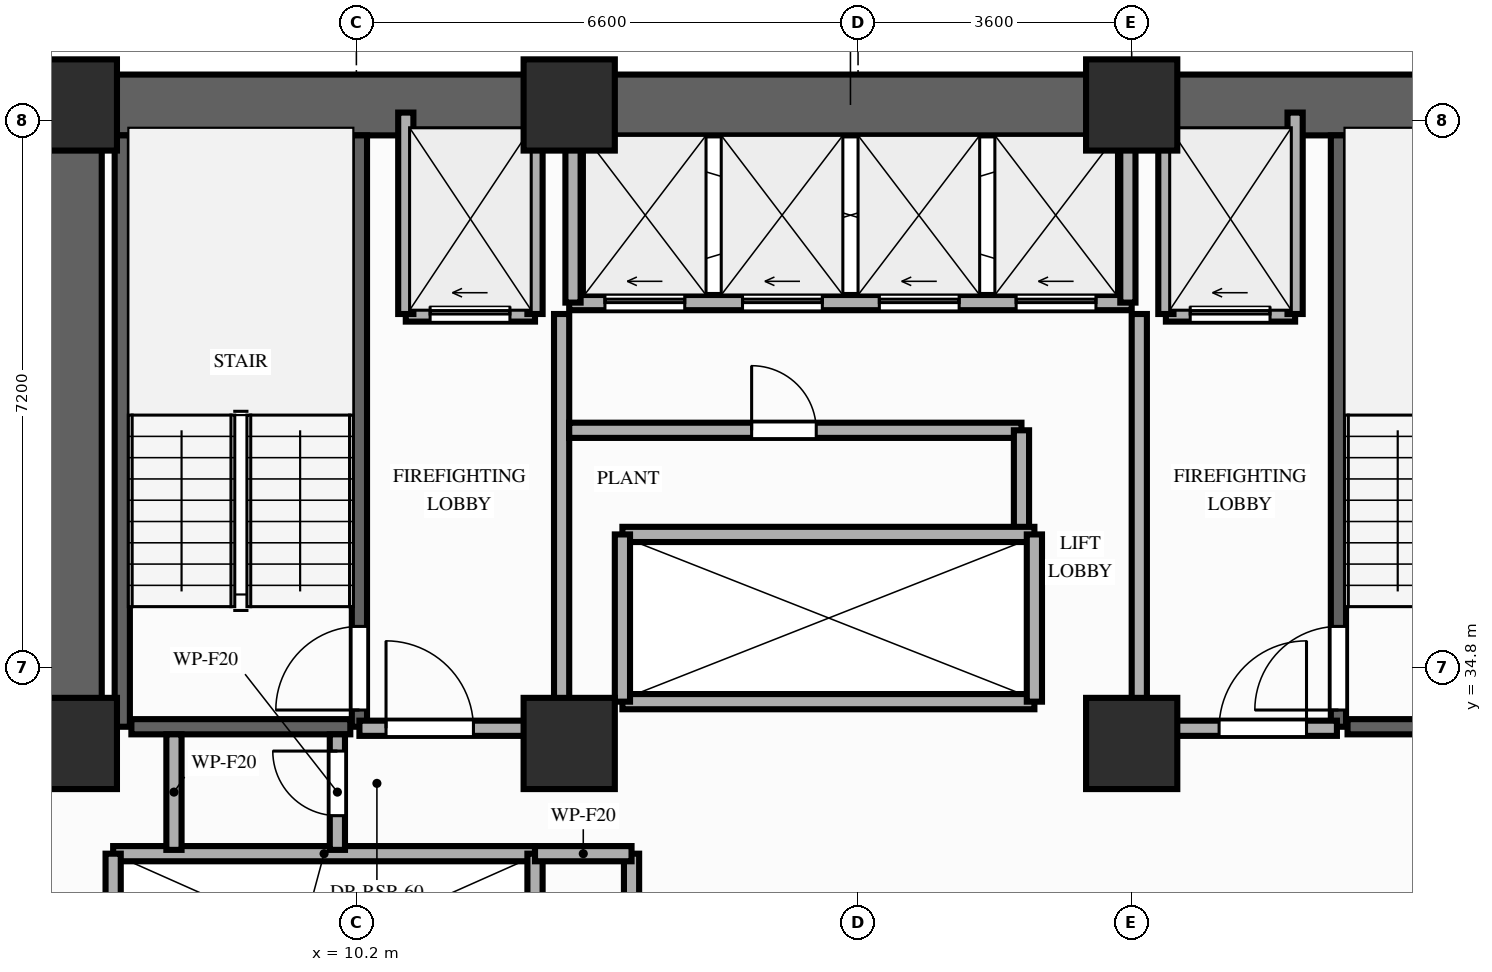
"""IFC4 building model, lengths in metres.
Left out: names, types, materials, properties, quantities, classifications, styles, units other than length and angle.
Written with IfcOpenShell. Run it as: python <this file> out.ifc"""

import sys

from ifc_helpers import new_model, si_unit, direction, frame, frame_2d, origin, origin_2d, place, context, subcontext, project, spatial, rectangle, extrude, element, fill, save


model = new_model("IFC4")
c1 = context("Model", 3, precision=1e-05, world=origin(), true_north=direction((0.0, 1.0)))
c2 = subcontext(c1, "Body", "Model", "MODEL_VIEW")
j1 = project(units=[si_unit("LENGTHUNIT", "METRE"), si_unit("PLANEANGLEUNIT", "RADIAN")], contexts=[c1])
p1 = place(None, origin())
s1 = spatial("IfcSite", under=j1, at=p1, CompositionType="ELEMENT")
p2 = place(p1, origin())
s2 = spatial("IfcBuilding", under=s1, at=p2, CompositionType="ELEMENT")
p3 = place(p2, frame((0.0, 0.0, 50.0)))
s3 = spatial("IfcBuildingStorey", under=s2, at=p3, CompositionType="ELEMENT", Elevation=50.0)
for number, where, z_axis, x_axis in (
    (1, (6.45, 33.8, 0.0), (0.0, 0.0, 1.0), (1.0, 0.0, 0.0)),
    (2, (13.0, 33.8, 0.0), (0.0, 0.0, 1.0), (1.0, 0.0, 0.0)),
    (3, (20.4, 33.8, 0.0), (0.0, 0.0, 1.0), (1.0, 0.0, 0.0)),
    (4, (6.45, 42.2, 0.0), (0.0, 0.0, 1.0), (1.0, 0.0, 0.0)),
    (5, (13.0, 42.2, 0.0), (0.0, 0.0, 1.0), (1.0, 0.0, 0.0)),
    (6, (20.4, 42.2, 0.0), (0.0, 0.0, 1.0), (1.0, 0.0, 0.0)),
):
    element("IfcColumn", number, at=place(p3, frame(where, z_axis=z_axis, x_axis=x_axis)), inside=s3, PredefinedType="COLUMN", context=c2, shape_type="SweptSolid", body=[
        extrude(rectangle(XDim=1.2, YDim=1.2, at=origin_2d()), origin(), (0.0, 0.0, 1.0), 3.2),
    ])
p4 = place(p3, frame((6.45, 42.2, 0.0), z_axis=(0.0, 0.0, 1.0), x_axis=(1.0, 0.0, 0.0)))
e7 = element("IfcWall", 7, at=p4, inside=s3, PredefinedType="SHEAR", context=c2, shape_type="SweptSolid", body=[
    extrude(rectangle(XDim=20.45, YDim=0.8, at=frame_2d((10.225, 0.0))), origin(), (0.0, 0.0, 1.0), 3.02),
])
p5 = place(p3, frame((6.45, 33.8, 0.0), z_axis=(0.0, 0.0, 1.0), x_axis=(0.0, 1.0, 0.0)))
e8 = element("IfcWall", 8, at=p5, inside=s3, PredefinedType="SHEAR", context=c2, shape_type="SweptSolid", body=[
    extrude(rectangle(XDim=7.95, YDim=0.8, at=frame_2d((3.975, 0.0))), origin(), (0.0, 0.0, 1.0), 3.02),
])
p6 = place(p3, frame((7.12, 34.02, 0.0), z_axis=(0.0, 0.0, 1.0), x_axis=(0.0, 1.0, 0.0)))
e9 = element("IfcWall", 9, at=p6, inside=s3, PredefinedType="SHEAR", context=c2, shape_type="SweptSolid", body=[
    extrude(rectangle(XDim=7.78, YDim=0.2, at=frame_2d((3.89, 0.0))), origin(), (0.0, 0.0, 1.0), 3.02),
])
p7 = place(p3, frame((10.24, 34.02, 0.0), z_axis=(0.0, 0.0, 1.0), x_axis=(0.0, 1.0, 0.0)))
e10 = element("IfcWall", 10, at=p7, inside=s3, PredefinedType="SHEAR", context=c2, shape_type="SweptSolid", body=[
    extrude(rectangle(XDim=7.78, YDim=0.2, at=frame_2d((3.89, 0.0))), origin(), (0.0, 0.0, 1.0), 3.02),
])
p8 = place(p7, frame((0.22, 0.0, 0.0)))
e11 = element("IfcOpeningElement", 11, at=p8, cuts=e10, PredefinedType="OPENING", context=c2, shape_type="SweptSolid", body=[
    extrude(rectangle(XDim=1.1, YDim=2.15, at=frame_2d((0.55, 1.075))), frame((0.0, 0.11, 0.0), z_axis=(0.0, -1.0, 0.0), x_axis=(1.0, 0.0, 0.0)), (0.0, 0.0, 1.0), 0.22),
])
p9 = place(p3, frame((7.24, 34.02, 0.0), z_axis=(0.0, 0.0, 1.0), x_axis=(1.0, 0.0, 0.0)))
e12 = element("IfcWall", 12, at=p9, inside=s3, PredefinedType="SHEAR", context=c2, shape_type="SweptSolid", body=[
    extrude(rectangle(XDim=2.88, YDim=0.2, at=frame_2d((1.44, 0.0))), origin(), (0.0, 0.0, 1.0), 3.02),
])
p10 = place(p3, frame((23.12, 34.02, 0.0), z_axis=(0.0, 0.0, 1.0), x_axis=(0.0, 1.0, 0.0)))
e13 = element("IfcWall", 13, at=p10, inside=s3, PredefinedType="SHEAR", context=c2, shape_type="SweptSolid", body=[
    extrude(rectangle(XDim=7.78, YDim=0.2, at=frame_2d((3.89, 0.0))), origin(), (0.0, 0.0, 1.0), 3.02),
])
p11 = place(p10, frame((0.22, 0.0, 0.0)))
e14 = element("IfcOpeningElement", 14, at=p11, cuts=e13, PredefinedType="OPENING", context=c2, shape_type="SweptSolid", body=[
    extrude(rectangle(XDim=1.1, YDim=2.15, at=frame_2d((0.55, 1.075))), frame((0.0, 0.11, 0.0), z_axis=(0.0, -1.0, 0.0), x_axis=(1.0, 0.0, 0.0)), (0.0, 0.0, 1.0), 0.22),
])
p12 = place(p3, frame((23.24, 34.02, 0.0), z_axis=(0.0, 0.0, 1.0), x_axis=(1.0, 0.0, 0.0)))
e15 = element("IfcWall", 15, at=p12, inside=s3, PredefinedType="SHEAR", context=c2, shape_type="SweptSolid", body=[
    extrude(rectangle(XDim=2.88, YDim=0.2, at=frame_2d((1.44, 0.0))), origin(), (0.0, 0.0, 1.0), 3.02),
])
p13 = place(p3, frame((7.0, 32.35, 0.0), z_axis=(0.0, 0.0, 1.0), x_axis=(1.0, 0.0, 0.0)))
e16 = element("IfcWall", 16, at=p13, inside=s3, PredefinedType="MOVABLE", context=c2, shape_type="SweptSolid", body=[
    extrude(rectangle(XDim=5.55, YDim=0.2, at=frame_2d((2.775, 0.0))), origin(), (0.0, 0.0, 1.0), 3.02),
])
for number, where, z_axis, x_axis in (
    (17, (7.0, 29.85, 0.0), (0.0, 0.0, 1.0), (0.0, 1.0, 0.0)),
    (18, (12.55, 29.85, 0.0), (0.0, 0.0, 1.0), (0.0, 1.0, 0.0)),
):
    element("IfcWall", number, at=place(p3, frame(where, z_axis=z_axis, x_axis=x_axis)), inside=s3, PredefinedType="MOVABLE", context=c2, shape_type="SweptSolid", body=[
        extrude(rectangle(XDim=2.5, YDim=0.2, at=frame_2d((1.25, 0.0))), origin(), (0.0, 0.0, 1.0), 3.02),
    ])
p14 = place(p3, frame((10.85, 39.45, 0.0), z_axis=(0.0, 0.0, 1.0), x_axis=(1.0, 0.0, 0.0)))
e19 = element("IfcWall", 19, at=p14, inside=s3, PredefinedType="MOVABLE", context=c2, shape_type="SweptSolid", body=[
    extrude(rectangle(XDim=1.7, YDim=0.2, at=frame_2d((0.85, 0.0))), origin(), (0.0, 0.0, 1.0), 3.02),
])
p15 = place(p14, frame((0.32, 0.0, 0.0)))
e20 = element("IfcOpeningElement", 20, at=p15, cuts=e19, PredefinedType="OPENING", context=c2, shape_type="SweptSolid", body=[
    extrude(rectangle(XDim=1.05, YDim=2.15, at=frame_2d((0.525, 1.075))), frame((0.0, 0.11, 0.0), z_axis=(0.0, -1.0, 0.0), x_axis=(1.0, 0.0, 0.0)), (0.0, 0.0, 1.0), 0.22),
])
p16 = place(p3, frame((20.85, 39.45, 0.0), z_axis=(0.0, 0.0, 1.0), x_axis=(1.0, 0.0, 0.0)))
e21 = element("IfcWall", 21, at=p16, inside=s3, PredefinedType="MOVABLE", context=c2, shape_type="SweptSolid", body=[
    extrude(rectangle(XDim=1.7, YDim=0.2, at=frame_2d((0.85, 0.0))), origin(), (0.0, 0.0, 1.0), 3.02),
])
p17 = place(p16, frame((0.32, 0.0, 0.0)))
e22 = element("IfcOpeningElement", 22, at=p17, cuts=e21, PredefinedType="OPENING", context=c2, shape_type="SweptSolid", body=[
    extrude(rectangle(XDim=1.05, YDim=2.15, at=frame_2d((0.525, 1.075))), frame((0.0, 0.11, 0.0), z_axis=(0.0, -1.0, 0.0), x_axis=(1.0, 0.0, 0.0)), (0.0, 0.0, 1.0), 0.22),
])
for number, where, z_axis, x_axis in (
    (23, (10.85, 39.45, 0.0), (0.0, 0.0, 1.0), (0.0, 1.0, 0.0)),
    (24, (12.55, 39.45, 0.0), (0.0, 0.0, 1.0), (0.0, 1.0, 0.0)),
):
    element("IfcWall", number, at=place(p3, frame(where, z_axis=z_axis, x_axis=x_axis)), inside=s3, PredefinedType="MOVABLE", context=c2, shape_type="SweptSolid", body=[
        extrude(rectangle(XDim=2.65, YDim=0.2, at=frame_2d((1.325, 0.0))), origin(), (0.0, 0.0, 1.0), 2.41),
    ])
p18 = place(p3, frame((12.9, 34.0, 0.0), z_axis=(0.0, 0.0, 1.0), x_axis=(0.0, 1.0, 0.0)))
e25 = element("IfcWall", 25, at=p18, inside=s3, PredefinedType="PARTITIONING", context=c2, shape_type="SweptSolid", body=[
    extrude(rectangle(XDim=5.45, YDim=0.2, at=frame_2d((2.725, 0.0))), origin(), (0.0, 0.0, 1.0), 2.41),
])
p19 = place(p3, frame((10.24, 34.0, 0.0), z_axis=(0.0, 0.0, 1.0), x_axis=(1.0, 0.0, 0.0)))
e26 = element("IfcWall", 26, at=p19, inside=s3, PredefinedType="PARTITIONING", context=c2, shape_type="SweptSolid", body=[
    extrude(rectangle(XDim=2.66, YDim=0.2, at=frame_2d((1.33, 0.0))), origin(), (0.0, 0.0, 1.0), 2.41),
])
p20 = place(p19, frame((0.35, 0.0, 0.0)))
e27 = element("IfcOpeningElement", 27, at=p20, cuts=e26, PredefinedType="OPENING", context=c2, shape_type="SweptSolid", body=[
    extrude(rectangle(XDim=1.15, YDim=2.15, at=frame_2d((0.575, 1.075))), frame((0.0, 0.11, 0.0), z_axis=(0.0, -1.0, 0.0), x_axis=(1.0, 0.0, 0.0)), (0.0, 0.0, 1.0), 0.22),
])
for number, where, z_axis, x_axis in (
    (28, (20.85, 39.45, 0.0), (0.0, 0.0, 1.0), (0.0, 1.0, 0.0)),
    (29, (22.55, 39.45, 0.0), (0.0, 0.0, 1.0), (0.0, 1.0, 0.0)),
):
    element("IfcWall", number, at=place(p3, frame(where, z_axis=z_axis, x_axis=x_axis)), inside=s3, PredefinedType="MOVABLE", context=c2, shape_type="SweptSolid", body=[
        extrude(rectangle(XDim=2.65, YDim=0.2, at=frame_2d((1.325, 0.0))), origin(), (0.0, 0.0, 1.0), 2.41),
    ])
p21 = place(p3, frame((20.5, 34.0, 0.0), z_axis=(0.0, 0.0, 1.0), x_axis=(0.0, 1.0, 0.0)))
e30 = element("IfcWall", 30, at=p21, inside=s3, PredefinedType="PARTITIONING", context=c2, shape_type="SweptSolid", body=[
    extrude(rectangle(XDim=5.45, YDim=0.2, at=frame_2d((2.725, 0.0))), origin(), (0.0, 0.0, 1.0), 2.41),
])
p22 = place(p3, frame((20.5, 34.0, 0.0), z_axis=(0.0, 0.0, 1.0), x_axis=(1.0, 0.0, 0.0)))
e31 = element("IfcWall", 31, at=p22, inside=s3, PredefinedType="PARTITIONING", context=c2, shape_type="SweptSolid", body=[
    extrude(rectangle(XDim=2.6, YDim=0.2, at=frame_2d((1.3, 0.0))), origin(), (0.0, 0.0, 1.0), 2.41),
])
p23 = place(p22, frame((1.05, 0.0, 0.0)))
e32 = element("IfcOpeningElement", 32, at=p23, cuts=e31, PredefinedType="OPENING", context=c2, shape_type="SweptSolid", body=[
    extrude(rectangle(XDim=1.15, YDim=2.15, at=frame_2d((0.575, 1.075))), frame((0.0, 0.11, 0.0), z_axis=(0.0, -1.0, 0.0), x_axis=(1.0, 0.0, 0.0)), (0.0, 0.0, 1.0), 0.22),
])
p24 = place(p3, frame((13.82, 29.85, 0.0), z_axis=(0.0, 0.0, 1.0), x_axis=(0.0, 1.0, 0.0)))
e33 = element("IfcWall", 33, at=p24, inside=s3, PredefinedType="PARTITIONING", context=c2, shape_type="SweptSolid", body=[
    extrude(rectangle(XDim=2.5, YDim=0.2, at=frame_2d((1.25, 0.0))), origin(), (0.0, 0.0, 1.0), 3.02),
])
p25 = place(p3, frame((12.55, 32.35, 0.0), z_axis=(0.0, 0.0, 1.0), x_axis=(1.0, 0.0, 0.0)))
e34 = element("IfcWall", 34, at=p25, inside=s3, PredefinedType="PARTITIONING", context=c2, shape_type="SweptSolid", body=[
    extrude(rectangle(XDim=1.27, YDim=0.2, at=frame_2d((0.635, 0.0))), origin(), (0.0, 0.0, 1.0), 3.02),
])
p26 = place(p3, frame((7.8, 32.4, 0.0), z_axis=(0.0, 0.0, 1.0), x_axis=(0.0, 1.0, 0.0)))
e35 = element("IfcWall", 35, at=p26, inside=s3, PredefinedType="PARTITIONING", context=c2, shape_type="SweptSolid", body=[
    extrude(rectangle(XDim=1.52, YDim=0.2, at=frame_2d((0.76, 0.0))), origin(), (0.0, 0.0, 1.0), 2.41),
])
p27 = place(p3, frame((9.95, 32.4, 0.0), z_axis=(0.0, 0.0, 1.0), x_axis=(0.0, 1.0, 0.0)))
e36 = element("IfcWall", 36, at=p27, inside=s3, PredefinedType="PARTITIONING", context=c2, shape_type="SweptSolid", body=[
    extrude(rectangle(XDim=1.52, YDim=0.2, at=frame_2d((0.76, 0.0))), origin(), (0.0, 0.0, 1.0), 2.41),
])
p28 = place(p27, frame((0.45, 0.0, 0.0)))
e37 = element("IfcOpeningElement", 37, at=p28, cuts=e36, PredefinedType="OPENING", context=c2, shape_type="SweptSolid", body=[
    extrude(rectangle(XDim=0.85, YDim=2.05, at=frame_2d((0.425, 1.025))), frame((0.0, 0.11, 0.0), z_axis=(0.0, -1.0, 0.0), x_axis=(1.0, 0.0, 0.0)), (0.0, 0.0, 1.0), 0.22),
])
p29 = place(p3, frame((13.0, 39.6, 0.0), z_axis=(0.0, 0.0, 1.0), x_axis=(1.0, 0.0, 0.0)))
e38 = element("IfcWall", 38, at=p29, inside=s3, PredefinedType="MOVABLE", context=c2, shape_type="SweptSolid", body=[
    extrude(rectangle(XDim=7.4, YDim=0.2, at=frame_2d((3.7, 0.0))), origin(), (0.0, 0.0, 1.0), 3.02),
])
p30 = place(p29, frame((0.47, 0.0, 0.0)))
e39 = element("IfcOpeningElement", 39, at=p30, cuts=e38, PredefinedType="OPENING", context=c2, shape_type="SweptSolid", body=[
    extrude(rectangle(XDim=1.05, YDim=2.15, at=frame_2d((0.525, 1.075))), frame((0.0, 0.11, 0.0), z_axis=(0.0, -1.0, 0.0), x_axis=(1.0, 0.0, 0.0)), (0.0, 0.0, 1.0), 0.22),
])
p31 = place(p29, frame((2.28, 0.0, 0.0)))
e40 = element("IfcOpeningElement", 40, at=p31, cuts=e38, PredefinedType="OPENING", context=c2, shape_type="SweptSolid", body=[
    extrude(rectangle(XDim=1.05, YDim=2.15, at=frame_2d((0.525, 1.075))), frame((0.0, 0.11, 0.0), z_axis=(0.0, -1.0, 0.0), x_axis=(1.0, 0.0, 0.0)), (0.0, 0.0, 1.0), 0.22),
])
p32 = place(p29, frame((4.08, 0.0, 0.0)))
e41 = element("IfcOpeningElement", 41, at=p32, cuts=e38, PredefinedType="OPENING", context=c2, shape_type="SweptSolid", body=[
    extrude(rectangle(XDim=1.05, YDim=2.15, at=frame_2d((0.525, 1.075))), frame((0.0, 0.11, 0.0), z_axis=(0.0, -1.0, 0.0), x_axis=(1.0, 0.0, 0.0)), (0.0, 0.0, 1.0), 0.22),
])
p33 = place(p29, frame((5.88, 0.0, 0.0)))
e42 = element("IfcOpeningElement", 42, at=p33, cuts=e38, PredefinedType="OPENING", context=c2, shape_type="SweptSolid", body=[
    extrude(rectangle(XDim=1.05, YDim=2.15, at=frame_2d((0.525, 1.075))), frame((0.0, 0.11, 0.0), z_axis=(0.0, -1.0, 0.0), x_axis=(1.0, 0.0, 0.0)), (0.0, 0.0, 1.0), 0.22),
])
for number, where, z_axis, x_axis in (
    (43, (13.05, 39.6, 0.0), (0.0, 0.0, 1.0), (0.0, 1.0, 0.0)),
    (44, (20.35, 39.6, 0.0), (0.0, 0.0, 1.0), (0.0, 1.0, 0.0)),
):
    element("IfcWall", number, at=place(p3, frame(where, z_axis=z_axis, x_axis=x_axis)), inside=s3, PredefinedType="MOVABLE", context=c2, shape_type="SweptSolid", body=[
        extrude(rectangle(XDim=2.18, YDim=0.2, at=frame_2d((1.09, 0.0))), origin(), (0.0, 0.0, 1.0), 3.02),
    ])
p34 = place(p3, frame((13.0, 37.92, 0.0), z_axis=(0.0, 0.0, 1.0), x_axis=(1.0, 0.0, 0.0)))
e45 = element("IfcWall", 45, at=p34, inside=s3, PredefinedType="PARTITIONING", context=c2, shape_type="SweptSolid", body=[
    extrude(rectangle(XDim=5.95, YDim=0.2, at=frame_2d((2.975, 0.0))), origin(), (0.0, 0.0, 1.0), 3.02),
])
p35 = place(p34, frame((2.4, 0.0, 0.0)))
e46 = element("IfcOpeningElement", 46, at=p35, cuts=e45, PredefinedType="OPENING", context=c2, shape_type="SweptSolid", body=[
    extrude(rectangle(XDim=0.85, YDim=2.05, at=frame_2d((0.425, 1.025))), frame((0.0, 0.11, 0.0), z_axis=(0.0, -1.0, 0.0), x_axis=(1.0, 0.0, 0.0)), (0.0, 0.0, 1.0), 0.22),
])
p36 = place(p3, frame((18.95, 36.6, 0.0), z_axis=(0.0, 0.0, 1.0), x_axis=(0.0, 1.0, 0.0)))
e47 = element("IfcWall", 47, at=p36, inside=s3, PredefinedType="PARTITIONING", context=c2, shape_type="SweptSolid", body=[
    extrude(rectangle(XDim=1.32, YDim=0.2, at=frame_2d((0.66, 0.0))), origin(), (0.0, 0.0, 1.0), 3.02),
])
for number, where, z_axis, x_axis in (
    (48, (13.7, 34.35, 0.0), (0.0, 0.0, 1.0), (1.0, 0.0, 0.0)),
    (49, (13.7, 36.55, 0.0), (0.0, 0.0, 1.0), (1.0, 0.0, 0.0)),
):
    element("IfcWall", number, at=place(p3, frame(where, z_axis=z_axis, x_axis=x_axis)), inside=s3, PredefinedType="MOVABLE", context=c2, shape_type="SweptSolid", body=[
        extrude(rectangle(XDim=5.42, YDim=0.2, at=frame_2d((2.71, 0.0))), origin(), (0.0, 0.0, 1.0), 3.02),
    ])
for number, where, z_axis, x_axis in (
    (50, (13.7, 34.35, 0.0), (0.0, 0.0, 1.0), (0.0, 1.0, 0.0)),
    (51, (19.12, 34.35, 0.0), (0.0, 0.0, 1.0), (0.0, 1.0, 0.0)),
):
    element("IfcWall", number, at=place(p3, frame(where, z_axis=z_axis, x_axis=x_axis)), inside=s3, PredefinedType="MOVABLE", context=c2, shape_type="SweptSolid", body=[
        extrude(rectangle(XDim=2.2, YDim=0.2, at=frame_2d((1.1, 0.0))), origin(), (0.0, 0.0, 1.0), 3.02),
    ])
p37 = place(p8, origin())
e52 = element("IfcDoor", 52, at=p37, inside=s3, OperationType="SINGLE_SWING_LEFT", PredefinedType="DOOR", context=c2, shape_type="SweptSolid", body=[
    extrude(rectangle(XDim=1.1, YDim=2.15, at=frame_2d((0.55, 1.075))), frame((0.0, 0.025, 0.0), z_axis=(0.0, -1.0, 0.0), x_axis=(1.0, 0.0, 0.0)), (0.0, 0.0, 1.0), 0.05),
])
fill(e11, e52)
p38 = place(p11, origin())
e53 = element("IfcDoor", 53, at=p38, inside=s3, OperationType="SINGLE_SWING_LEFT", PredefinedType="DOOR", context=c2, shape_type="SweptSolid", body=[
    extrude(rectangle(XDim=1.1, YDim=2.15, at=frame_2d((0.55, 1.075))), frame((0.0, 0.025, 0.0), z_axis=(0.0, -1.0, 0.0), x_axis=(1.0, 0.0, 0.0)), (0.0, 0.0, 1.0), 0.05),
])
fill(e14, e53)
p39 = place(p15, origin())
e54 = element("IfcDoor", 54, at=p39, inside=s3, OperationType="SLIDING_TO_LEFT", PredefinedType="DOOR", context=c2, shape_type="SweptSolid", body=[
    extrude(rectangle(XDim=1.05, YDim=2.15, at=frame_2d((0.525, 1.075))), frame((0.0, 0.025, 0.0), z_axis=(0.0, -1.0, 0.0), x_axis=(1.0, 0.0, 0.0)), (0.0, 0.0, 1.0), 0.05),
])
fill(e20, e54)
p40 = place(p17, origin())
e55 = element("IfcDoor", 55, at=p40, inside=s3, OperationType="SLIDING_TO_LEFT", PredefinedType="DOOR", context=c2, shape_type="SweptSolid", body=[
    extrude(rectangle(XDim=1.05, YDim=2.15, at=frame_2d((0.525, 1.075))), frame((0.0, 0.025, 0.0), z_axis=(0.0, -1.0, 0.0), x_axis=(1.0, 0.0, 0.0)), (0.0, 0.0, 1.0), 0.05),
])
fill(e22, e55)
p41 = place(p20, origin())
e56 = element("IfcDoor", 56, at=p41, inside=s3, OperationType="SINGLE_SWING_LEFT", PredefinedType="DOOR", context=c2, shape_type="SweptSolid", body=[
    extrude(rectangle(XDim=1.15, YDim=2.15, at=frame_2d((0.575, 1.075))), frame((0.0, 0.025, 0.0), z_axis=(0.0, -1.0, 0.0), x_axis=(1.0, 0.0, 0.0)), (0.0, 0.0, 1.0), 0.05),
])
fill(e27, e56)
p42 = place(p23, origin())
e57 = element("IfcDoor", 57, at=p42, inside=s3, OperationType="SINGLE_SWING_RIGHT", PredefinedType="DOOR", context=c2, shape_type="SweptSolid", body=[
    extrude(rectangle(XDim=1.15, YDim=2.15, at=frame_2d((0.575, 1.075))), frame((0.0, 0.025, 0.0), z_axis=(0.0, -1.0, 0.0), x_axis=(1.0, 0.0, 0.0)), (0.0, 0.0, 1.0), 0.05),
])
fill(e32, e57)
p43 = place(p28, origin())
e58 = element("IfcDoor", 58, at=p43, inside=s3, OperationType="SINGLE_SWING_RIGHT", PredefinedType="DOOR", context=c2, shape_type="SweptSolid", body=[
    extrude(rectangle(XDim=0.85, YDim=2.05, at=frame_2d((0.425, 1.025))), frame((0.0, 0.025, 0.0), z_axis=(0.0, -1.0, 0.0), x_axis=(1.0, 0.0, 0.0)), (0.0, 0.0, 1.0), 0.05),
])
fill(e37, e58)
p44 = place(p30, origin())
e59 = element("IfcDoor", 59, at=p44, inside=s3, OperationType="SLIDING_TO_LEFT", PredefinedType="DOOR", context=c2, shape_type="SweptSolid", body=[
    extrude(rectangle(XDim=1.05, YDim=2.15, at=frame_2d((0.525, 1.075))), frame((0.0, 0.025, 0.0), z_axis=(0.0, -1.0, 0.0), x_axis=(1.0, 0.0, 0.0)), (0.0, 0.0, 1.0), 0.05),
])
fill(e39, e59)
p45 = place(p31, origin())
e60 = element("IfcDoor", 60, at=p45, inside=s3, OperationType="SLIDING_TO_LEFT", PredefinedType="DOOR", context=c2, shape_type="SweptSolid", body=[
    extrude(rectangle(XDim=1.05, YDim=2.15, at=frame_2d((0.525, 1.075))), frame((0.0, 0.025, 0.0), z_axis=(0.0, -1.0, 0.0), x_axis=(1.0, 0.0, 0.0)), (0.0, 0.0, 1.0), 0.05),
])
fill(e40, e60)
p46 = place(p32, origin())
e61 = element("IfcDoor", 61, at=p46, inside=s3, OperationType="SLIDING_TO_LEFT", PredefinedType="DOOR", context=c2, shape_type="SweptSolid", body=[
    extrude(rectangle(XDim=1.05, YDim=2.15, at=frame_2d((0.525, 1.075))), frame((0.0, 0.025, 0.0), z_axis=(0.0, -1.0, 0.0), x_axis=(1.0, 0.0, 0.0)), (0.0, 0.0, 1.0), 0.05),
])
fill(e41, e61)
p47 = place(p33, origin())
e62 = element("IfcDoor", 62, at=p47, inside=s3, OperationType="SLIDING_TO_LEFT", PredefinedType="DOOR", context=c2, shape_type="SweptSolid", body=[
    extrude(rectangle(XDim=1.05, YDim=2.15, at=frame_2d((0.525, 1.075))), frame((0.0, 0.025, 0.0), z_axis=(0.0, -1.0, 0.0), x_axis=(1.0, 0.0, 0.0)), (0.0, 0.0, 1.0), 0.05),
])
fill(e42, e62)
p48 = place(p35, origin())
e63 = element("IfcDoor", 63, at=p48, inside=s3, OperationType="SINGLE_SWING_LEFT", PredefinedType="DOOR", context=c2, shape_type="SweptSolid", body=[
    extrude(rectangle(XDim=0.85, YDim=2.05, at=frame_2d((0.425, 1.025))), frame((0.0, 0.025, 0.0), z_axis=(0.0, -1.0, 0.0), x_axis=(1.0, 0.0, 0.0)), (0.0, 0.0, 1.0), 0.05),
])
fill(e46, e63)
save(model, sys.argv[1])
